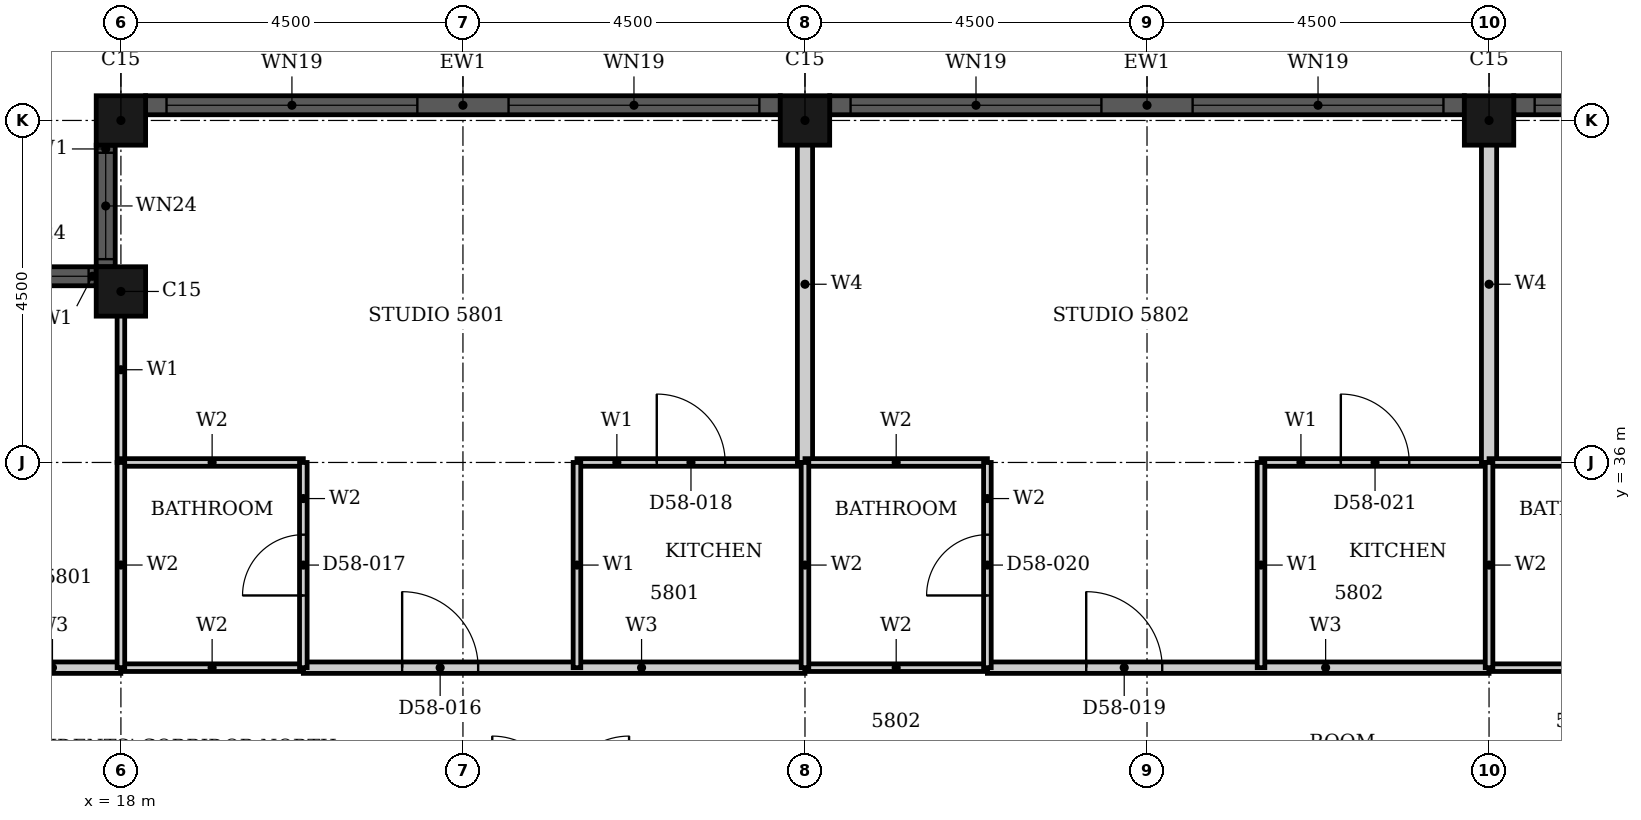
"""IFC4 building model, lengths in metres.
Left out: names, types, materials, properties, quantities, classifications, styles, units other than length and angle.
Written with IfcOpenShell. Run it as: python <this file> out.ifc"""

import sys

from ifc_helpers import new_model, si_unit, direction, frame, frame_2d, origin, origin_2d, place, context, subcontext, project, spatial, rectangle, hollow_rectangle, extrude, element, fill, save


model = new_model("IFC4")
c1 = context("Model", 3, precision=1e-05, world=origin(), true_north=direction((0.0, 1.0)))
c2 = subcontext(c1, "Body", "Model", "MODEL_VIEW")
j1 = project(units=[si_unit("LENGTHUNIT", "METRE"), si_unit("PLANEANGLEUNIT", "RADIAN")], contexts=[c1])
p1 = place(None, origin())
s1 = spatial("IfcSite", under=j1, at=p1, CompositionType="ELEMENT")
p2 = place(p1, origin())
s2 = spatial("IfcBuilding", under=s1, at=p2, CompositionType="ELEMENT")
p3 = place(p2, frame((0.0, 0.0, 229.4)))
s3 = spatial("IfcBuildingStorey", under=s2, at=p3, CompositionType="ELEMENT", Elevation=229.4)
for number, where, z_axis, x_axis in (
    (1, (36.0, 40.5, 0.0), (0.0, 0.0, 1.0), (1.0, 0.0, 0.0)),
    (2, (27.0, 40.5, 0.0), (0.0, 0.0, 1.0), (1.0, 0.0, 0.0)),
    (3, (18.0, 40.5, 0.0), (0.0, 0.0, 1.0), (1.0, 0.0, 0.0)),
    (4, (18.0, 38.25, 0.0), (0.0, 0.0, 1.0), (1.0, 0.0, 0.0)),
):
    element("IfcColumn", number, at=place(p3, frame(where, z_axis=z_axis, x_axis=x_axis)), inside=s3, PredefinedType="COLUMN", context=c2, shape_type="SweptSolid", body=[
        extrude(hollow_rectangle(XDim=0.65, YDim=0.65, WallThickness=0.021, at=origin_2d()), origin(), (0.0, 0.0, 1.0), 3.7),
    ])
p4 = place(p3, frame((44.675, 40.7, 0.0), z_axis=(0.0, 0.0, 1.0), x_axis=(-1.0, 0.0, 0.0)))
e5 = element("IfcWall", 5, at=p4, inside=s3, PredefinedType="SOLIDWALL", context=c2, shape_type="SweptSolid", body=[
    extrude(rectangle(XDim=8.35, YDim=0.25, at=frame_2d((4.175, 0.0))), origin(), (0.0, 0.0, 1.0), 3.7),
])
p5 = place(p4, frame((0.275, 0.0, 0.45)))
e6 = element("IfcOpeningElement", 6, at=p5, cuts=e5, PredefinedType="OPENING", context=c2, shape_type="SweptSolid", body=[
    extrude(rectangle(XDim=3.3, YDim=2.2, at=frame_2d((1.65, 1.1))), frame((0.0, 0.135, 0.0), z_axis=(0.0, -1.0, 0.0), x_axis=(1.0, 0.0, 0.0)), (0.0, 0.0, 1.0), 0.27),
])
p6 = place(p4, frame((4.775, 0.0, 0.45)))
e7 = element("IfcOpeningElement", 7, at=p6, cuts=e5, PredefinedType="OPENING", context=c2, shape_type="SweptSolid", body=[
    extrude(rectangle(XDim=3.3, YDim=2.2, at=frame_2d((1.65, 1.1))), frame((0.0, 0.135, 0.0), z_axis=(0.0, -1.0, 0.0), x_axis=(1.0, 0.0, 0.0)), (0.0, 0.0, 1.0), 0.27),
])
p7 = place(p3, frame((35.675, 40.7, 0.0), z_axis=(0.0, 0.0, 1.0), x_axis=(-1.0, 0.0, 0.0)))
e8 = element("IfcWall", 8, at=p7, inside=s3, PredefinedType="SOLIDWALL", context=c2, shape_type="SweptSolid", body=[
    extrude(rectangle(XDim=8.35, YDim=0.25, at=frame_2d((4.175, 0.0))), origin(), (0.0, 0.0, 1.0), 3.7),
])
p8 = place(p7, frame((0.275, 0.0, 0.45)))
e9 = element("IfcOpeningElement", 9, at=p8, cuts=e8, PredefinedType="OPENING", context=c2, shape_type="SweptSolid", body=[
    extrude(rectangle(XDim=3.3, YDim=2.2, at=frame_2d((1.65, 1.1))), frame((0.0, 0.135, 0.0), z_axis=(0.0, -1.0, 0.0), x_axis=(1.0, 0.0, 0.0)), (0.0, 0.0, 1.0), 0.27),
])
p9 = place(p7, frame((4.775, 0.0, 0.45)))
e10 = element("IfcOpeningElement", 10, at=p9, cuts=e8, PredefinedType="OPENING", context=c2, shape_type="SweptSolid", body=[
    extrude(rectangle(XDim=3.3, YDim=2.2, at=frame_2d((1.65, 1.1))), frame((0.0, 0.135, 0.0), z_axis=(0.0, -1.0, 0.0), x_axis=(1.0, 0.0, 0.0)), (0.0, 0.0, 1.0), 0.27),
])
p10 = place(p3, frame((26.675, 40.7, 0.0), z_axis=(0.0, 0.0, 1.0), x_axis=(-1.0, 0.0, 0.0)))
e11 = element("IfcWall", 11, at=p10, inside=s3, PredefinedType="SOLIDWALL", context=c2, shape_type="SweptSolid", body=[
    extrude(rectangle(XDim=8.35, YDim=0.25, at=frame_2d((4.175, 0.0))), origin(), (0.0, 0.0, 1.0), 3.7),
])
p11 = place(p10, frame((0.275, 0.0, 0.45)))
e12 = element("IfcOpeningElement", 12, at=p11, cuts=e11, PredefinedType="OPENING", context=c2, shape_type="SweptSolid", body=[
    extrude(rectangle(XDim=3.3, YDim=2.2, at=frame_2d((1.65, 1.1))), frame((0.0, 0.135, 0.0), z_axis=(0.0, -1.0, 0.0), x_axis=(1.0, 0.0, 0.0)), (0.0, 0.0, 1.0), 0.27),
])
p12 = place(p10, frame((4.775, 0.0, 0.45)))
e13 = element("IfcOpeningElement", 13, at=p12, cuts=e11, PredefinedType="OPENING", context=c2, shape_type="SweptSolid", body=[
    extrude(rectangle(XDim=3.3, YDim=2.2, at=frame_2d((1.65, 1.1))), frame((0.0, 0.135, 0.0), z_axis=(0.0, -1.0, 0.0), x_axis=(1.0, 0.0, 0.0)), (0.0, 0.0, 1.0), 0.27),
])
p13 = place(p3, frame((17.8, 40.175, 0.0), z_axis=(0.0, 0.0, 1.0), x_axis=(0.0, -1.0, 0.0)))
e14 = element("IfcWall", 14, at=p13, inside=s3, PredefinedType="SOLIDWALL", context=c2, shape_type="SweptSolid", body=[
    extrude(rectangle(XDim=1.6, YDim=0.25, at=frame_2d((0.8, 0.0))), origin(), (0.0, 0.0, 1.0), 3.7),
])
p14 = place(p13, frame((0.1, 0.0, 0.9)))
e15 = element("IfcOpeningElement", 15, at=p14, cuts=e14, PredefinedType="OPENING", context=c2, shape_type="SweptSolid", body=[
    extrude(rectangle(XDim=1.4, YDim=1.75, at=frame_2d((0.7, 0.875))), frame((0.0, 0.135, 0.0), z_axis=(0.0, -1.0, 0.0), x_axis=(1.0, 0.0, 0.0)), (0.0, 0.0, 1.0), 0.27),
])
p15 = place(p3, frame((17.675, 38.45, 0.0), z_axis=(0.0, 0.0, 1.0), x_axis=(-1.0, 0.0, 0.0)))
e16 = element("IfcWall", 16, at=p15, inside=s3, PredefinedType="SOLIDWALL", context=c2, shape_type="SweptSolid", body=[
    extrude(rectangle(XDim=1.6, YDim=0.25, at=frame_2d((0.8, 0.0))), origin(), (0.0, 0.0, 1.0), 3.7),
])
p16 = place(p15, frame((0.1, 0.0, 0.9)))
e17 = element("IfcOpeningElement", 17, at=p16, cuts=e16, PredefinedType="OPENING", context=c2, shape_type="SweptSolid", body=[
    extrude(rectangle(XDim=1.4, YDim=1.75, at=frame_2d((0.7, 0.875))), frame((0.0, 0.135, 0.0), z_axis=(0.0, -1.0, 0.0), x_axis=(1.0, 0.0, 0.0)), (0.0, 0.0, 1.0), 0.27),
])
p17 = place(p3, frame((20.4, 33.3, 0.0), z_axis=(0.0, 0.0, 1.0), x_axis=(1.0, 0.0, 0.0)))
e18 = element("IfcWall", 18, at=p17, inside=s3, PredefinedType="PARTITIONING", context=c2, shape_type="SweptSolid", body=[
    extrude(rectangle(XDim=6.6, YDim=0.15, at=frame_2d((3.3, 0.0))), origin(), (0.0, 0.0, 1.0), 3.3),
])
p18 = place(p17, frame((1.3, 0.0, 0.0)))
e19 = element("IfcOpeningElement", 19, at=p18, cuts=e18, PredefinedType="OPENING", context=c2, shape_type="SweptSolid", body=[
    extrude(rectangle(XDim=1.0, YDim=2.2, at=frame_2d((0.5, 1.1))), frame((0.0, 0.085, 0.0), z_axis=(0.0, -1.0, 0.0), x_axis=(1.0, 0.0, 0.0)), (0.0, 0.0, 1.0), 0.17),
])
p19 = place(p3, frame((29.4, 33.3, 0.0), z_axis=(0.0, 0.0, 1.0), x_axis=(1.0, 0.0, 0.0)))
e20 = element("IfcWall", 20, at=p19, inside=s3, PredefinedType="PARTITIONING", context=c2, shape_type="SweptSolid", body=[
    extrude(rectangle(XDim=6.6, YDim=0.15, at=frame_2d((3.3, 0.0))), origin(), (0.0, 0.0, 1.0), 3.3),
])
p20 = place(p19, frame((1.3, 0.0, 0.0)))
e21 = element("IfcOpeningElement", 21, at=p20, cuts=e20, PredefinedType="OPENING", context=c2, shape_type="SweptSolid", body=[
    extrude(rectangle(XDim=1.0, YDim=2.2, at=frame_2d((0.5, 1.1))), frame((0.0, 0.085, 0.0), z_axis=(0.0, -1.0, 0.0), x_axis=(1.0, 0.0, 0.0)), (0.0, 0.0, 1.0), 0.17),
])
p21 = place(p3, frame((16.2, 33.3, 0.0), z_axis=(0.0, 0.0, 1.0), x_axis=(1.0, 0.0, 0.0)))
e22 = element("IfcWall", 22, at=p21, inside=s3, PredefinedType="PARTITIONING", context=c2, shape_type="SweptSolid", body=[
    extrude(rectangle(XDim=1.799, YDim=0.15, at=frame_2d((0.899, 0.0))), origin(), (0.0, 0.0, 1.0), 3.3),
])
p22 = place(p3, frame((24.0, 36.0, 0.0), z_axis=(0.0, 0.0, 1.0), x_axis=(1.0, 0.0, 0.0)))
e23 = element("IfcWall", 23, at=p22, inside=s3, PredefinedType="PARTITIONING", context=c2, shape_type="SweptSolid", body=[
    extrude(rectangle(XDim=3.0, YDim=0.1, at=frame_2d((1.5, 0.0))), origin(), (0.0, 0.0, 1.0), 3.3),
])
p23 = place(p22, frame((1.05, 0.0, 0.0)))
e24 = element("IfcOpeningElement", 24, at=p23, cuts=e23, PredefinedType="OPENING", context=c2, shape_type="SweptSolid", body=[
    extrude(rectangle(XDim=0.9, YDim=2.1, at=frame_2d((0.45, 1.05))), frame((0.0, 0.06, 0.0), z_axis=(0.0, -1.0, 0.0), x_axis=(1.0, 0.0, 0.0)), (0.0, 0.0, 1.0), 0.12),
])
p24 = place(p3, frame((33.0, 36.0, 0.0), z_axis=(0.0, 0.0, 1.0), x_axis=(1.0, 0.0, 0.0)))
e25 = element("IfcWall", 25, at=p24, inside=s3, PredefinedType="PARTITIONING", context=c2, shape_type="SweptSolid", body=[
    extrude(rectangle(XDim=3.0, YDim=0.1, at=frame_2d((1.5, 0.0))), origin(), (0.0, 0.0, 1.0), 3.3),
])
p25 = place(p24, frame((1.05, 0.0, 0.0)))
e26 = element("IfcOpeningElement", 26, at=p25, cuts=e25, PredefinedType="OPENING", context=c2, shape_type="SweptSolid", body=[
    extrude(rectangle(XDim=0.9, YDim=2.1, at=frame_2d((0.45, 1.05))), frame((0.0, 0.06, 0.0), z_axis=(0.0, -1.0, 0.0), x_axis=(1.0, 0.0, 0.0)), (0.0, 0.0, 1.0), 0.12),
])
p26 = place(p3, frame((18.0, 36.0, 0.0), z_axis=(0.0, 0.0, 1.0), x_axis=(0.0, 1.0, 0.0)))
e27 = element("IfcWall", 27, at=p26, inside=s3, PredefinedType="PARTITIONING", context=c2, shape_type="SweptSolid", body=[
    extrude(rectangle(XDim=2.44, YDim=0.1, at=frame_2d((1.22, 0.0))), origin(), (0.0, 0.0, 1.0), 3.3),
])
for number, where, z_axis, x_axis in (
    (28, (24.0, 33.3, 0.0), (0.0, 0.0, 1.0), (0.0, 1.0, 0.0)),
    (29, (33.0, 33.3, 0.0), (0.0, 0.0, 1.0), (0.0, 1.0, 0.0)),
):
    element("IfcWall", number, at=place(p3, frame(where, z_axis=z_axis, x_axis=x_axis)), inside=s3, PredefinedType="PARTITIONING", context=c2, shape_type="SweptSolid", body=[
        extrude(rectangle(XDim=2.7, YDim=0.1, at=frame_2d((1.35, 0.0))), origin(), (0.0, 0.0, 1.0), 3.3),
    ])
for number, where, z_axis, x_axis in (
    (30, (27.0, 36.0, 0.0), (0.0, 0.0, 1.0), (0.0, 1.0, 0.0)),
    (31, (36.0, 36.0, 0.0), (0.0, 0.0, 1.0), (0.0, 1.0, 0.0)),
):
    element("IfcWall", number, at=place(p3, frame(where, z_axis=z_axis, x_axis=x_axis)), inside=s3, PredefinedType="PARTITIONING", context=c2, shape_type="SweptSolid", body=[
        extrude(rectangle(XDim=4.69, YDim=0.2, at=frame_2d((2.345, 0.0))), origin(), (0.0, 0.0, 1.0), 3.3),
    ])
for number, where, z_axis, x_axis in (
    (32, (18.0, 33.3, 0.0), (0.0, 0.0, 1.0), (1.0, 0.0, 0.0)),
    (33, (27.0, 33.3, 0.0), (0.0, 0.0, 1.0), (1.0, 0.0, 0.0)),
    (34, (36.0, 33.3, 0.0), (0.0, 0.0, 1.0), (1.0, 0.0, 0.0)),
    (35, (18.0, 36.0, 0.0), (0.0, 0.0, 1.0), (1.0, 0.0, 0.0)),
    (36, (27.0, 36.0, 0.0), (0.0, 0.0, 1.0), (1.0, 0.0, 0.0)),
    (37, (36.0, 36.0, 0.0), (0.0, 0.0, 1.0), (1.0, 0.0, 0.0)),
):
    element("IfcWall", number, at=place(p3, frame(where, z_axis=z_axis, x_axis=x_axis)), inside=s3, PredefinedType="PARTITIONING", context=c2, shape_type="SweptSolid", body=[
        extrude(rectangle(XDim=2.4, YDim=0.1, at=frame_2d((1.2, 0.0))), origin(), (0.0, 0.0, 1.0), 3.3),
    ])
p27 = place(p3, frame((18.0, 33.301, 0.0), z_axis=(0.0, 0.0, 1.0), x_axis=(0.0, 1.0, 0.0)))
e38 = element("IfcWall", 38, at=p27, inside=s3, PredefinedType="PARTITIONING", context=c2, shape_type="SweptSolid", body=[
    extrude(rectangle(XDim=2.699, YDim=0.1, at=frame_2d((1.35, 0.0))), origin(), (0.0, 0.0, 1.0), 3.3),
])
p28 = place(p3, frame((20.4, 33.3, 0.0), z_axis=(0.0, 0.0, 1.0), x_axis=(0.0, 1.0, 0.0)))
e39 = element("IfcWall", 39, at=p28, inside=s3, PredefinedType="PARTITIONING", context=c2, shape_type="SweptSolid", body=[
    extrude(rectangle(XDim=2.7, YDim=0.1, at=frame_2d((1.35, 0.0))), origin(), (0.0, 0.0, 1.0), 3.3),
])
p29 = place(p28, frame((0.95, 0.0, 0.0)))
e40 = element("IfcOpeningElement", 40, at=p29, cuts=e39, PredefinedType="OPENING", context=c2, shape_type="SweptSolid", body=[
    extrude(rectangle(XDim=0.8, YDim=2.1, at=frame_2d((0.4, 1.05))), frame((0.0, 0.06, 0.0), z_axis=(0.0, -1.0, 0.0), x_axis=(1.0, 0.0, 0.0)), (0.0, 0.0, 1.0), 0.12),
])
p30 = place(p3, frame((27.0, 33.3, 0.0), z_axis=(0.0, 0.0, 1.0), x_axis=(0.0, 1.0, 0.0)))
e41 = element("IfcWall", 41, at=p30, inside=s3, PredefinedType="PARTITIONING", context=c2, shape_type="SweptSolid", body=[
    extrude(rectangle(XDim=2.7, YDim=0.1, at=frame_2d((1.35, 0.0))), origin(), (0.0, 0.0, 1.0), 3.3),
])
p31 = place(p3, frame((29.4, 33.3, 0.0), z_axis=(0.0, 0.0, 1.0), x_axis=(0.0, 1.0, 0.0)))
e42 = element("IfcWall", 42, at=p31, inside=s3, PredefinedType="PARTITIONING", context=c2, shape_type="SweptSolid", body=[
    extrude(rectangle(XDim=2.7, YDim=0.1, at=frame_2d((1.35, 0.0))), origin(), (0.0, 0.0, 1.0), 3.3),
])
p32 = place(p31, frame((0.95, 0.0, 0.0)))
e43 = element("IfcOpeningElement", 43, at=p32, cuts=e42, PredefinedType="OPENING", context=c2, shape_type="SweptSolid", body=[
    extrude(rectangle(XDim=0.8, YDim=2.1, at=frame_2d((0.4, 1.05))), frame((0.0, 0.06, 0.0), z_axis=(0.0, -1.0, 0.0), x_axis=(1.0, 0.0, 0.0)), (0.0, 0.0, 1.0), 0.12),
])
p33 = place(p3, frame((36.0, 33.3, 0.0), z_axis=(0.0, 0.0, 1.0), x_axis=(0.0, 1.0, 0.0)))
e44 = element("IfcWall", 44, at=p33, inside=s3, PredefinedType="PARTITIONING", context=c2, shape_type="SweptSolid", body=[
    extrude(rectangle(XDim=2.7, YDim=0.1, at=frame_2d((1.35, 0.0))), origin(), (0.0, 0.0, 1.0), 3.3),
])
p34 = place(p6, origin())
e45 = element("IfcWindow", 45, at=p34, inside=s3, PartitioningType="SINGLE_PANEL", PredefinedType="WINDOW", context=c2, shape_type="SweptSolid", body=[
    extrude(rectangle(XDim=3.3, YDim=2.2, at=frame_2d((1.65, 1.1))), frame((0.0, 0.03, 0.0), z_axis=(0.0, -1.0, 0.0), x_axis=(1.0, 0.0, 0.0)), (0.0, 0.0, 1.0), 0.06),
])
fill(e7, e45)
p35 = place(p8, origin())
e46 = element("IfcWindow", 46, at=p35, inside=s3, PartitioningType="SINGLE_PANEL", PredefinedType="WINDOW", context=c2, shape_type="SweptSolid", body=[
    extrude(rectangle(XDim=3.3, YDim=2.2, at=frame_2d((1.65, 1.1))), frame((0.0, 0.03, 0.0), z_axis=(0.0, -1.0, 0.0), x_axis=(1.0, 0.0, 0.0)), (0.0, 0.0, 1.0), 0.06),
])
fill(e9, e46)
p36 = place(p9, origin())
e47 = element("IfcWindow", 47, at=p36, inside=s3, PartitioningType="SINGLE_PANEL", PredefinedType="WINDOW", context=c2, shape_type="SweptSolid", body=[
    extrude(rectangle(XDim=3.3, YDim=2.2, at=frame_2d((1.65, 1.1))), frame((0.0, 0.03, 0.0), z_axis=(0.0, -1.0, 0.0), x_axis=(1.0, 0.0, 0.0)), (0.0, 0.0, 1.0), 0.06),
])
fill(e10, e47)
p37 = place(p11, origin())
e48 = element("IfcWindow", 48, at=p37, inside=s3, PartitioningType="SINGLE_PANEL", PredefinedType="WINDOW", context=c2, shape_type="SweptSolid", body=[
    extrude(rectangle(XDim=3.3, YDim=2.2, at=frame_2d((1.65, 1.1))), frame((0.0, 0.03, 0.0), z_axis=(0.0, -1.0, 0.0), x_axis=(1.0, 0.0, 0.0)), (0.0, 0.0, 1.0), 0.06),
])
fill(e12, e48)
p38 = place(p12, origin())
e49 = element("IfcWindow", 49, at=p38, inside=s3, PartitioningType="SINGLE_PANEL", PredefinedType="WINDOW", context=c2, shape_type="SweptSolid", body=[
    extrude(rectangle(XDim=3.3, YDim=2.2, at=frame_2d((1.65, 1.1))), frame((0.0, 0.03, 0.0), z_axis=(0.0, -1.0, 0.0), x_axis=(1.0, 0.0, 0.0)), (0.0, 0.0, 1.0), 0.06),
])
fill(e13, e49)
p39 = place(p14, origin())
e50 = element("IfcWindow", 50, at=p39, inside=s3, PartitioningType="SINGLE_PANEL", PredefinedType="WINDOW", context=c2, shape_type="SweptSolid", body=[
    extrude(rectangle(XDim=1.4, YDim=1.75, at=frame_2d((0.7, 0.875))), frame((0.0, 0.03, 0.0), z_axis=(0.0, -1.0, 0.0), x_axis=(1.0, 0.0, 0.0)), (0.0, 0.0, 1.0), 0.06),
])
fill(e15, e50)
p40 = place(p16, origin())
e51 = element("IfcWindow", 51, at=p40, inside=s3, PartitioningType="SINGLE_PANEL", PredefinedType="WINDOW", context=c2, shape_type="SweptSolid", body=[
    extrude(rectangle(XDim=1.4, YDim=1.75, at=frame_2d((0.7, 0.875))), frame((0.0, 0.03, 0.0), z_axis=(0.0, -1.0, 0.0), x_axis=(1.0, 0.0, 0.0)), (0.0, 0.0, 1.0), 0.06),
])
fill(e17, e51)
p41 = place(p18, origin())
e52 = element("IfcDoor", 52, at=p41, inside=s3, OperationType="SINGLE_SWING_RIGHT", PredefinedType="DOOR", context=c2, shape_type="SweptSolid", body=[
    extrude(rectangle(XDim=1.0, YDim=2.2, at=frame_2d((0.5, 1.1))), frame((0.0, 0.025, 0.0), z_axis=(0.0, -1.0, 0.0), x_axis=(1.0, 0.0, 0.0)), (0.0, 0.0, 1.0), 0.05),
])
fill(e19, e52)
p42 = place(p29, origin())
e53 = element("IfcDoor", 53, at=p42, inside=s3, OperationType="SINGLE_SWING_RIGHT", PredefinedType="DOOR", context=c2, shape_type="SweptSolid", body=[
    extrude(rectangle(XDim=0.8, YDim=2.1, at=frame_2d((0.4, 1.05))), frame((0.0, 0.025, 0.0), z_axis=(0.0, -1.0, 0.0), x_axis=(1.0, 0.0, 0.0)), (0.0, 0.0, 1.0), 0.05),
])
fill(e40, e53)
p43 = place(p23, origin())
e54 = element("IfcDoor", 54, at=p43, inside=s3, OperationType="SINGLE_SWING_LEFT", PredefinedType="DOOR", context=c2, shape_type="SweptSolid", body=[
    extrude(rectangle(XDim=0.9, YDim=2.1, at=frame_2d((0.45, 1.05))), frame((0.0, 0.025, 0.0), z_axis=(0.0, -1.0, 0.0), x_axis=(1.0, 0.0, 0.0)), (0.0, 0.0, 1.0), 0.05),
])
fill(e24, e54)
p44 = place(p20, origin())
e55 = element("IfcDoor", 55, at=p44, inside=s3, OperationType="SINGLE_SWING_RIGHT", PredefinedType="DOOR", context=c2, shape_type="SweptSolid", body=[
    extrude(rectangle(XDim=1.0, YDim=2.2, at=frame_2d((0.5, 1.1))), frame((0.0, 0.025, 0.0), z_axis=(0.0, -1.0, 0.0), x_axis=(1.0, 0.0, 0.0)), (0.0, 0.0, 1.0), 0.05),
])
fill(e21, e55)
p45 = place(p32, origin())
e56 = element("IfcDoor", 56, at=p45, inside=s3, OperationType="SINGLE_SWING_LEFT", PredefinedType="DOOR", context=c2, shape_type="SweptSolid", body=[
    extrude(rectangle(XDim=0.8, YDim=2.1, at=frame_2d((0.4, 1.05))), frame((0.0, 0.025, 0.0), z_axis=(0.0, -1.0, 0.0), x_axis=(1.0, 0.0, 0.0)), (0.0, 0.0, 1.0), 0.05),
])
fill(e43, e56)
p46 = place(p25, origin())
e57 = element("IfcDoor", 57, at=p46, inside=s3, OperationType="SINGLE_SWING_RIGHT", PredefinedType="DOOR", context=c2, shape_type="SweptSolid", body=[
    extrude(rectangle(XDim=0.9, YDim=2.1, at=frame_2d((0.45, 1.05))), frame((0.0, 0.025, 0.0), z_axis=(0.0, -1.0, 0.0), x_axis=(1.0, 0.0, 0.0)), (0.0, 0.0, 1.0), 0.05),
])
fill(e26, e57)
save(model, sys.argv[1])
